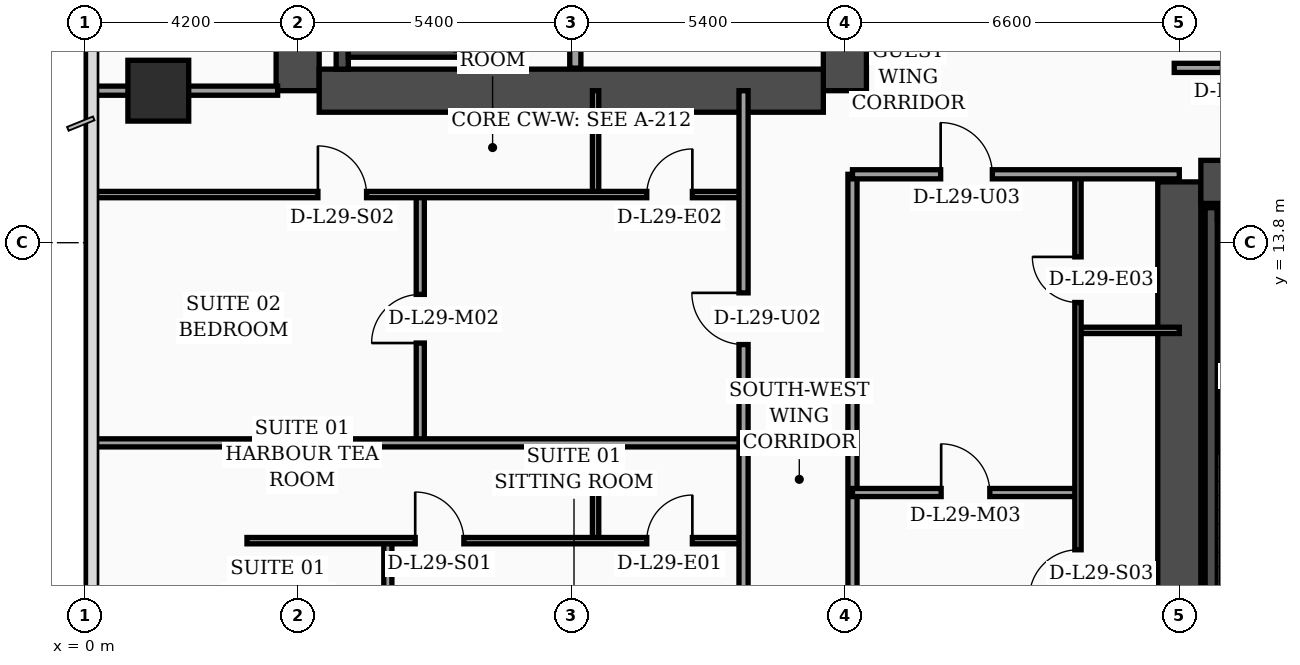
"""IFC4 building model, lengths in metres.
Left out: names, types, materials, properties, quantities, classifications, styles, units other than length and angle.
Written with IfcOpenShell. Run it as: python <this file> out.ifc"""

import sys

from ifc_helpers import new_model, si_unit, direction, frame, frame_2d, origin, origin_2d, place, context, subcontext, project, spatial, rectangle, extrude, element, fill, save


model = new_model("IFC4")
c1 = context("Model", 3, precision=1e-05, world=origin(), true_north=direction((0.0, 1.0)))
c2 = subcontext(c1, "Body", "Model", "MODEL_VIEW")
j1 = project(units=[si_unit("LENGTHUNIT", "METRE"), si_unit("PLANEANGLEUNIT", "RADIAN")], contexts=[c1])
p1 = place(None, origin())
s1 = spatial("IfcSite", under=j1, at=p1, CompositionType="ELEMENT")
p2 = place(p1, origin())
s2 = spatial("IfcBuilding", under=s1, at=p2, CompositionType="ELEMENT")
p3 = place(p2, frame((0.0, 0.0, 120.2)))
s3 = spatial("IfcBuildingStorey", under=s2, at=p3, CompositionType="ELEMENT", Elevation=120.2)
p4 = place(p3, frame((4.2, 16.8, 0.0), z_axis=(0.0, 0.0, 1.0), x_axis=(0.0, 1.0, 0.0)))
e1 = element("IfcWall", 1, at=p4, inside=s3, PredefinedType="SHEAR", context=c2, shape_type="SweptSolid", body=[
    extrude(rectangle(XDim=21.6, YDim=0.85, at=frame_2d((10.8, 0.0))), origin(), (0.0, 0.0, 1.0), 3.56),
])
p5 = place(p3, frame((15.0, 16.8, 0.0), z_axis=(0.0, 0.0, 1.0), x_axis=(0.0, 1.0, 0.0)))
e2 = element("IfcWall", 2, at=p5, inside=s3, PredefinedType="SHEAR", context=c2, shape_type="SweptSolid", body=[
    extrude(rectangle(XDim=21.6, YDim=0.85, at=frame_2d((10.8, 0.0))), origin(), (0.0, 0.0, 1.0), 3.56),
])
p6 = place(p5, frame((8.65, 0.0, 0.0)))
e3 = element("IfcOpeningElement", 3, at=p6, cuts=e2, PredefinedType="OPENING", context=c2, shape_type="SweptSolid", body=[
    extrude(rectangle(XDim=1.1, YDim=2.2, at=frame_2d((0.55, 1.1))), frame((0.0, 0.435, 0.0), z_axis=(0.0, -1.0, 0.0), x_axis=(1.0, 0.0, 0.0)), (0.0, 0.0, 1.0), 0.87),
])
p7 = place(p5, frame((10.85, 0.0, 0.0)))
e4 = element("IfcOpeningElement", 4, at=p7, cuts=e2, PredefinedType="OPENING", context=c2, shape_type="SweptSolid", body=[
    extrude(rectangle(XDim=1.1, YDim=2.2, at=frame_2d((0.55, 1.1))), frame((0.0, 0.435, 0.0), z_axis=(0.0, -1.0, 0.0), x_axis=(1.0, 0.0, 0.0)), (0.0, 0.0, 1.0), 0.87),
])
p8 = place(p5, frame((13.5, 0.0, 0.0)))
e5 = element("IfcOpeningElement", 5, at=p8, cuts=e2, PredefinedType="OPENING", context=c2, shape_type="SweptSolid", body=[
    extrude(rectangle(XDim=1.1, YDim=2.2, at=frame_2d((0.55, 1.1))), frame((0.0, 0.435, 0.0), z_axis=(0.0, -1.0, 0.0), x_axis=(1.0, 0.0, 0.0)), (0.0, 0.0, 1.0), 0.87),
])
p9 = place(p5, frame((16.15, 0.0, 0.0)))
e6 = element("IfcOpeningElement", 6, at=p9, cuts=e2, PredefinedType="OPENING", context=c2, shape_type="SweptSolid", body=[
    extrude(rectangle(XDim=1.1, YDim=2.2, at=frame_2d((0.55, 1.1))), frame((0.0, 0.435, 0.0), z_axis=(0.0, -1.0, 0.0), x_axis=(1.0, 0.0, 0.0)), (0.0, 0.0, 1.0), 0.87),
])
p10 = place(p3, frame((4.625, 16.8, 0.0), z_axis=(0.0, 0.0, 1.0), x_axis=(1.0, 0.0, 0.0)))
e7 = element("IfcWall", 7, at=p10, inside=s3, PredefinedType="SHEAR", context=c2, shape_type="SweptSolid", body=[
    extrude(rectangle(XDim=9.95, YDim=0.85, at=frame_2d((4.975, 0.0))), origin(), (0.0, 0.0, 1.0), 3.56),
])
p11 = place(p3, frame((21.6, 4.6, 0.0), z_axis=(0.0, 0.0, 1.0), x_axis=(0.0, 1.0, 0.0)))
e8 = element("IfcWall", 8, at=p11, inside=s3, PredefinedType="SHEAR", context=c2, shape_type="SweptSolid", body=[
    extrude(rectangle(XDim=10.4, YDim=0.85, at=frame_2d((5.2, 0.0))), origin(), (0.0, 0.0, 1.0), 3.56),
])
p12 = place(p3, frame((22.025, 15.0, 0.0), z_axis=(0.0, 0.0, 1.0), x_axis=(1.0, 0.0, 0.0)))
e9 = element("IfcWall", 9, at=p12, inside=s3, PredefinedType="SHEAR", context=c2, shape_type="SweptSolid", body=[
    extrude(rectangle(XDim=9.95, YDim=0.85, at=frame_2d((4.975, 0.0))), origin(), (0.0, 0.0, 1.0), 3.56),
])
p13 = place(p12, frame((4.88, 0.0, 0.0)))
e10 = element("IfcOpeningElement", 10, at=p13, cuts=e9, PredefinedType="OPENING", context=c2, shape_type="SweptSolid", body=[
    extrude(rectangle(XDim=1.1, YDim=2.2, at=frame_2d((0.55, 1.1))), frame((0.0, 0.435, 0.0), z_axis=(0.0, -1.0, 0.0), x_axis=(1.0, 0.0, 0.0)), (0.0, 0.0, 1.0), 0.87),
])
p14 = place(p3, frame((5.08, 17.225, 0.0), z_axis=(0.0, 0.0, 1.0), x_axis=(0.0, 1.0, 0.0)))
e11 = element("IfcWall", 11, at=p14, inside=s3, PredefinedType="SOLIDWALL", context=c2, shape_type="SweptSolid", body=[
    extrude(rectangle(XDim=9.565, YDim=0.24, at=frame_2d((4.782, 0.0))), origin(), (0.0, 0.0, 1.0), 3.56),
])
p15 = place(p3, frame((8.42, 17.225, 0.0), z_axis=(0.0, 0.0, 1.0), x_axis=(0.0, 1.0, 0.0)))
e12 = element("IfcWall", 12, at=p15, inside=s3, PredefinedType="SOLIDWALL", context=c2, shape_type="SweptSolid", body=[
    extrude(rectangle(XDim=9.565, YDim=0.24, at=frame_2d((4.782, 0.0))), origin(), (0.0, 0.0, 1.0), 3.56),
])
p16 = place(p15, frame((0.35, 0.0, 0.0)))
e13 = element("IfcOpeningElement", 13, at=p16, cuts=e12, PredefinedType="OPENING", context=c2, shape_type="SweptSolid", body=[
    extrude(rectangle(XDim=1.15, YDim=2.2, at=frame_2d((0.575, 1.1))), frame((0.0, 0.13, 0.0), z_axis=(0.0, -1.0, 0.0), x_axis=(1.0, 0.0, 0.0)), (0.0, 0.0, 1.0), 0.26),
])
p17 = place(p3, frame((5.2, 17.58, 0.0), z_axis=(0.0, 0.0, 1.0), x_axis=(1.0, 0.0, 0.0)))
e14 = element("IfcWall", 14, at=p17, inside=s3, PredefinedType="SOLIDWALL", context=c2, shape_type="SweptSolid", body=[
    extrude(rectangle(XDim=3.1, YDim=0.24, at=frame_2d((1.55, 0.0))), origin(), (0.0, 0.0, 1.0), 3.56),
])
p18 = place(p3, frame((22.23, 5.025, 0.0), z_axis=(0.0, 0.0, 1.0), x_axis=(0.0, 1.0, 0.0)))
e15 = element("IfcWall", 15, at=p18, inside=s3, PredefinedType="SOLIDWALL", context=c2, shape_type="SweptSolid", body=[
    extrude(rectangle(XDim=9.465, YDim=0.24, at=frame_2d((4.732, 0.0))), origin(), (0.0, 0.0, 1.0), 3.56),
])
p19 = place(p3, frame((22.35, 14.37, 0.0), z_axis=(0.0, 0.0, 1.0), x_axis=(1.0, 0.0, 0.0)))
e16 = element("IfcWall", 16, at=p19, inside=s3, PredefinedType="SOLIDWALL", context=c2, shape_type="SweptSolid", body=[
    extrude(rectangle(XDim=3.1, YDim=0.24, at=frame_2d((1.55, 0.0))), origin(), (0.0, 0.0, 1.0), 3.56),
])
p20 = place(p3, frame((1.45, 16.8, 0.0), z_axis=(0.0, 0.0, 1.0), x_axis=(1.0, 0.0, 0.0)))
e17 = element("IfcColumn", 17, at=p20, inside=s3, PredefinedType="COLUMN", context=c2, shape_type="SweptSolid", body=[
    extrude(rectangle(XDim=1.2, YDim=1.2, at=origin_2d()), origin(), (0.0, 0.0, 1.0), 3.56),
])
p21 = place(p3, frame((9.68, 17.245, 0.0), z_axis=(0.0, 0.0, 1.0), x_axis=(0.0, 1.0, 0.0)))
e18 = element("IfcWall", 18, at=p21, inside=s3, PredefinedType="SOLIDWALL", context=c2, shape_type="SweptSolid", body=[
    extrude(rectangle(XDim=7.755, YDim=0.22, at=frame_2d((3.877, 0.0))), origin(), (0.0, 0.0, 1.0), 3.56),
])
p22 = place(p3, frame((0.08, 16.8, 0.0), z_axis=(0.0, 0.0, 1.0), x_axis=(1.0, 0.0, 0.0)))
e19 = element("IfcWall", 19, at=p22, inside=s3, PredefinedType="PARTITIONING", context=c2, shape_type="SweptSolid", body=[
    extrude(rectangle(XDim=3.725, YDim=0.18, at=frame_2d((1.862, 0.0))), origin(), (0.0, 0.0, 1.0), 2.84),
])
p23 = place(p3, frame((10.08, 7.92, 0.0), z_axis=(0.0, 0.0, 1.0), x_axis=(0.0, 1.0, 0.0)))
e20 = element("IfcWall", 20, at=p23, inside=s3, PredefinedType="PARTITIONING", context=c2, shape_type="SweptSolid", body=[
    extrude(rectangle(XDim=1.93, YDim=0.125, at=frame_2d((0.965, 0.0))), origin(), (0.0, 0.0, 1.0), 3.09),
])
p24 = place(p3, frame((5.98, 2.44, 0.0), z_axis=(0.0, 0.0, 1.0), x_axis=(0.0, 1.0, 0.0)))
e21 = element("IfcWall", 21, at=p24, inside=s3, PredefinedType="PARTITIONING", context=c2, shape_type="SweptSolid", body=[
    extrude(rectangle(XDim=5.48, YDim=0.16, at=frame_2d((2.74, 0.0))), origin(), (0.0, 0.0, 1.0), 3.04),
])
p25 = place(p24, frame((2.26, 0.0, 0.0)))
e22 = element("IfcOpeningElement", 22, at=p25, cuts=e21, PredefinedType="OPENING", context=c2, shape_type="SweptSolid", body=[
    extrude(rectangle(XDim=0.96, YDim=2.2, at=frame_2d((0.48, 1.1))), frame((0.0, 0.09, 0.0), z_axis=(0.0, -1.0, 0.0), x_axis=(1.0, 0.0, 0.0)), (0.0, 0.0, 1.0), 0.18),
])
p26 = place(p3, frame((3.2, 7.92, 0.0), z_axis=(0.0, 0.0, 1.0), x_axis=(1.0, 0.0, 0.0)))
e23 = element("IfcWall", 23, at=p26, inside=s3, PredefinedType="PARTITIONING", context=c2, shape_type="SweptSolid", body=[
    extrude(rectangle(XDim=9.8, YDim=0.125, at=frame_2d((4.9, 0.0))), origin(), (0.0, 0.0, 1.0), 2.84),
])
p27 = place(p26, frame((3.32, 0.0, 0.0)))
e24 = element("IfcOpeningElement", 24, at=p27, cuts=e23, PredefinedType="OPENING", context=c2, shape_type="SweptSolid", body=[
    extrude(rectangle(XDim=0.96, YDim=2.2, at=frame_2d((0.48, 1.1))), frame((0.0, 0.073, 0.0), z_axis=(0.0, -1.0, 0.0), x_axis=(1.0, 0.0, 0.0)), (0.0, 0.0, 1.0), 0.145),
])
p28 = place(p26, frame((7.89, 0.0, 0.0)))
e25 = element("IfcOpeningElement", 25, at=p28, cuts=e23, PredefinedType="OPENING", context=c2, shape_type="SweptSolid", body=[
    extrude(rectangle(XDim=0.9, YDim=2.15, at=frame_2d((0.45, 1.075))), frame((0.0, 0.073, 0.0), z_axis=(0.0, -1.0, 0.0), x_axis=(1.0, 0.0, 0.0)), (0.0, 0.0, 1.0), 0.145),
])
p29 = place(p3, frame((10.08, 14.75, 0.0), z_axis=(0.0, 0.0, 1.0), x_axis=(0.0, 1.0, 0.0)))
e26 = element("IfcWall", 26, at=p29, inside=s3, PredefinedType="PARTITIONING", context=c2, shape_type="SweptSolid", body=[
    extrude(rectangle(XDim=2.05, YDim=0.125, at=frame_2d((1.025, 0.0))), origin(), (0.0, 0.0, 1.0), 3.56),
])
p30 = place(p3, frame((6.62, 9.85, 0.0), z_axis=(0.0, 0.0, 1.0), x_axis=(0.0, 1.0, 0.0)))
e27 = element("IfcWall", 27, at=p30, inside=s3, PredefinedType="PARTITIONING", context=c2, shape_type="SweptSolid", body=[
    extrude(rectangle(XDim=4.9, YDim=0.16, at=frame_2d((2.45, 0.0))), origin(), (0.0, 0.0, 1.0), 3.14),
])
p31 = place(p30, frame((1.97, 0.0, 0.0)))
e28 = element("IfcOpeningElement", 28, at=p31, cuts=e27, PredefinedType="OPENING", context=c2, shape_type="SweptSolid", body=[
    extrude(rectangle(XDim=0.96, YDim=2.2, at=frame_2d((0.48, 1.1))), frame((0.0, 0.09, 0.0), z_axis=(0.0, -1.0, 0.0), x_axis=(1.0, 0.0, 0.0)), (0.0, 0.0, 1.0), 0.18),
])
p32 = place(p3, frame((0.08, 14.75, 0.0), z_axis=(0.0, 0.0, 1.0), x_axis=(1.0, 0.0, 0.0)))
e29 = element("IfcWall", 29, at=p32, inside=s3, PredefinedType="PARTITIONING", context=c2, shape_type="SweptSolid", body=[
    extrude(rectangle(XDim=12.92, YDim=0.125, at=frame_2d((6.46, 0.0))), origin(), (0.0, 0.0, 1.0), 2.84),
])
p33 = place(p32, frame((4.52, 0.0, 0.0)))
e30 = element("IfcOpeningElement", 30, at=p33, cuts=e29, PredefinedType="OPENING", context=c2, shape_type="SweptSolid", body=[
    extrude(rectangle(XDim=0.96, YDim=2.2, at=frame_2d((0.48, 1.1))), frame((0.0, 0.073, 0.0), z_axis=(0.0, -1.0, 0.0), x_axis=(1.0, 0.0, 0.0)), (0.0, 0.0, 1.0), 0.145),
])
p34 = place(p32, frame((11.01, 0.0, 0.0)))
e31 = element("IfcOpeningElement", 31, at=p34, cuts=e29, PredefinedType="OPENING", context=c2, shape_type="SweptSolid", body=[
    extrude(rectangle(XDim=0.9, YDim=2.15, at=frame_2d((0.45, 1.075))), frame((0.0, 0.073, 0.0), z_axis=(0.0, -1.0, 0.0), x_axis=(1.0, 0.0, 0.0)), (0.0, 0.0, 1.0), 0.145),
])
p35 = place(p3, frame((0.08, 9.85, 0.0), z_axis=(0.0, 0.0, 1.0), x_axis=(1.0, 0.0, 0.0)))
e32 = element("IfcWall", 32, at=p35, inside=s3, PredefinedType="PARTITIONING", context=c2, shape_type="SweptSolid", body=[
    extrude(rectangle(XDim=12.92, YDim=0.16, at=frame_2d((6.46, 0.0))), origin(), (0.0, 0.0, 1.0), 2.84),
])
p36 = place(p3, frame((13.0, 2.44, 0.0), z_axis=(0.0, 0.0, 1.0), x_axis=(0.0, 1.0, 0.0)))
e33 = element("IfcWall", 33, at=p36, inside=s3, PredefinedType="PARTITIONING", context=c2, shape_type="SweptSolid", body=[
    extrude(rectangle(XDim=14.36, YDim=0.18, at=frame_2d((7.18, 0.0))), origin(), (0.0, 0.0, 1.0), 2.84),
])
p37 = place(p36, frame((3.01, 0.0, 0.0)))
e34 = element("IfcOpeningElement", 34, at=p37, cuts=e33, PredefinedType="OPENING", context=c2, shape_type="SweptSolid", body=[
    extrude(rectangle(XDim=1.02, YDim=2.2, at=frame_2d((0.51, 1.1))), frame((0.0, 0.1, 0.0), z_axis=(0.0, -1.0, 0.0), x_axis=(1.0, 0.0, 0.0)), (0.0, 0.0, 1.0), 0.2),
])
p38 = place(p36, frame((9.35, 0.0, 0.0)))
e35 = element("IfcOpeningElement", 35, at=p38, cuts=e33, PredefinedType="OPENING", context=c2, shape_type="SweptSolid", body=[
    extrude(rectangle(XDim=1.02, YDim=2.2, at=frame_2d((0.51, 1.1))), frame((0.0, 0.1, 0.0), z_axis=(0.0, -1.0, 0.0), x_axis=(1.0, 0.0, 0.0)), (0.0, 0.0, 1.0), 0.2),
])
p39 = place(p3, frame((15.15, 2.44, 0.0), z_axis=(0.0, 0.0, 1.0), x_axis=(0.0, 1.0, 0.0)))
e36 = element("IfcWall", 36, at=p39, inside=s3, PredefinedType="PARTITIONING", context=c2, shape_type="SweptSolid", body=[
    extrude(rectangle(XDim=12.71, YDim=0.18, at=frame_2d((6.355, 0.0))), origin(), (0.0, 0.0, 1.0), 3.04),
])
p40 = place(p3, frame((19.6, 12.07, 0.0), z_axis=(0.0, 0.0, 1.0), x_axis=(1.0, 0.0, 0.0)))
e37 = element("IfcWall", 37, at=p40, inside=s3, PredefinedType="PARTITIONING", context=c2, shape_type="SweptSolid", body=[
    extrude(rectangle(XDim=2.0, YDim=0.125, at=frame_2d((1.0, 0.0))), origin(), (0.0, 0.0, 1.0), 3.56),
])
p41 = place(p3, frame((15.15, 8.87, 0.0), z_axis=(0.0, 0.0, 1.0), x_axis=(1.0, 0.0, 0.0)))
e38 = element("IfcWall", 38, at=p41, inside=s3, PredefinedType="PARTITIONING", context=c2, shape_type="SweptSolid", body=[
    extrude(rectangle(XDim=4.45, YDim=0.16, at=frame_2d((2.225, 0.0))), origin(), (0.0, 0.0, 1.0), 3.56),
])
p42 = place(p41, frame((1.75, 0.0, 0.0)))
e39 = element("IfcOpeningElement", 39, at=p42, cuts=e38, PredefinedType="OPENING", context=c2, shape_type="SweptSolid", body=[
    extrude(rectangle(XDim=0.96, YDim=2.2, at=frame_2d((0.48, 1.1))), frame((0.0, 0.09, 0.0), z_axis=(0.0, -1.0, 0.0), x_axis=(1.0, 0.0, 0.0)), (0.0, 0.0, 1.0), 0.18),
])
p43 = place(p3, frame((19.6, 2.44, 0.0), z_axis=(0.0, 0.0, 1.0), x_axis=(0.0, 1.0, 0.0)))
e40 = element("IfcWall", 40, at=p43, inside=s3, PredefinedType="PARTITIONING", context=c2, shape_type="SweptSolid", body=[
    extrude(rectangle(XDim=12.71, YDim=0.125, at=frame_2d((6.355, 0.0))), origin(), (0.0, 0.0, 1.0), 2.49),
])
p44 = place(p43, frame((4.34, 0.0, 0.0)))
e41 = element("IfcOpeningElement", 41, at=p44, cuts=e40, PredefinedType="OPENING", context=c2, shape_type="SweptSolid", body=[
    extrude(rectangle(XDim=0.96, YDim=2.2, at=frame_2d((0.48, 1.1))), frame((0.0, 0.073, 0.0), z_axis=(0.0, -1.0, 0.0), x_axis=(1.0, 0.0, 0.0)), (0.0, 0.0, 1.0), 0.145),
])
p45 = place(p43, frame((10.18, 0.0, 0.0)))
e42 = element("IfcOpeningElement", 42, at=p45, cuts=e40, PredefinedType="OPENING", context=c2, shape_type="SweptSolid", body=[
    extrude(rectangle(XDim=0.9, YDim=2.15, at=frame_2d((0.45, 1.075))), frame((0.0, 0.073, 0.0), z_axis=(0.0, -1.0, 0.0), x_axis=(1.0, 0.0, 0.0)), (0.0, 0.0, 1.0), 0.145),
])
p46 = place(p3, frame((15.15, 15.15, 0.0), z_axis=(0.0, 0.0, 1.0), x_axis=(1.0, 0.0, 0.0)))
e43 = element("IfcWall", 43, at=p46, inside=s3, PredefinedType="PARTITIONING", context=c2, shape_type="SweptSolid", body=[
    extrude(rectangle(XDim=6.45, YDim=0.18, at=frame_2d((3.225, 0.0))), origin(), (0.0, 0.0, 1.0), 2.49),
])
p47 = place(p46, frame((1.74, 0.0, 0.0)))
e44 = element("IfcOpeningElement", 44, at=p47, cuts=e43, PredefinedType="OPENING", context=c2, shape_type="SweptSolid", body=[
    extrude(rectangle(XDim=1.02, YDim=2.2, at=frame_2d((0.51, 1.1))), frame((0.0, 0.1, 0.0), z_axis=(0.0, -1.0, 0.0), x_axis=(1.0, 0.0, 0.0)), (0.0, 0.0, 1.0), 0.2),
])
p48 = place(p3, frame((21.5, 17.25, 0.0), z_axis=(0.0, 0.0, 1.0), x_axis=(1.0, 0.0, 0.0)))
e45 = element("IfcWall", 45, at=p48, inside=s3, PredefinedType="PARTITIONING", context=c2, shape_type="SweptSolid", body=[
    extrude(rectangle(XDim=24.25, YDim=0.18, at=frame_2d((12.125, 0.0))), origin(), (0.0, 0.0, 1.0), 2.84),
])
p49 = place(p48, frame((0.95, 0.0, 0.0)))
e46 = element("IfcOpeningElement", 46, at=p49, cuts=e45, PredefinedType="OPENING", context=c2, shape_type="SweptSolid", body=[
    extrude(rectangle(XDim=1.02, YDim=2.2, at=frame_2d((0.51, 1.1))), frame((0.0, 0.1, 0.0), z_axis=(0.0, -1.0, 0.0), x_axis=(1.0, 0.0, 0.0)), (0.0, 0.0, 1.0), 0.2),
])
p50 = place(p48, frame((9.0, 0.0, 0.0)))
e47 = element("IfcOpeningElement", 47, at=p50, cuts=e45, PredefinedType="OPENING", context=c2, shape_type="SweptSolid", body=[
    extrude(rectangle(XDim=1.02, YDim=2.2, at=frame_2d((0.51, 1.1))), frame((0.0, 0.1, 0.0), z_axis=(0.0, -1.0, 0.0), x_axis=(1.0, 0.0, 0.0)), (0.0, 0.0, 1.0), 0.2),
])
p51 = place(p48, frame((17.05, 0.0, 0.0)))
e48 = element("IfcOpeningElement", 48, at=p51, cuts=e45, PredefinedType="OPENING", context=c2, shape_type="SweptSolid", body=[
    extrude(rectangle(XDim=1.02, YDim=2.2, at=frame_2d((0.51, 1.1))), frame((0.0, 0.1, 0.0), z_axis=(0.0, -1.0, 0.0), x_axis=(1.0, 0.0, 0.0)), (0.0, 0.0, 1.0), 0.2),
])
p52 = place(p27, origin())
e49 = element("IfcDoor", 49, at=p52, inside=s3, OperationType="SINGLE_SWING_LEFT", PredefinedType="DOOR", context=c2, shape_type="SweptSolid", body=[
    extrude(rectangle(XDim=0.96, YDim=2.2, at=frame_2d((0.48, 1.1))), frame((0.0, 0.025, 0.0), z_axis=(0.0, -1.0, 0.0), x_axis=(1.0, 0.0, 0.0)), (0.0, 0.0, 1.0), 0.05),
])
fill(e24, e49)
p53 = place(p28, origin())
e50 = element("IfcDoor", 50, at=p53, inside=s3, OperationType="SINGLE_SWING_RIGHT", PredefinedType="DOOR", context=c2, shape_type="SweptSolid", body=[
    extrude(rectangle(XDim=0.9, YDim=2.15, at=frame_2d((0.45, 1.075))), frame((0.0, 0.025, 0.0), z_axis=(0.0, -1.0, 0.0), x_axis=(1.0, 0.0, 0.0)), (0.0, 0.0, 1.0), 0.05),
])
fill(e25, e50)
p54 = place(p31, origin())
e51 = element("IfcDoor", 51, at=p54, inside=s3, OperationType="SINGLE_SWING_LEFT", PredefinedType="DOOR", context=c2, shape_type="SweptSolid", body=[
    extrude(rectangle(XDim=0.96, YDim=2.2, at=frame_2d((0.48, 1.1))), frame((0.0, 0.025, 0.0), z_axis=(0.0, -1.0, 0.0), x_axis=(1.0, 0.0, 0.0)), (0.0, 0.0, 1.0), 0.05),
])
fill(e28, e51)
p55 = place(p33, origin())
e52 = element("IfcDoor", 52, at=p55, inside=s3, OperationType="SINGLE_SWING_LEFT", PredefinedType="DOOR", context=c2, shape_type="SweptSolid", body=[
    extrude(rectangle(XDim=0.96, YDim=2.2, at=frame_2d((0.48, 1.1))), frame((0.0, 0.025, 0.0), z_axis=(0.0, -1.0, 0.0), x_axis=(1.0, 0.0, 0.0)), (0.0, 0.0, 1.0), 0.05),
])
fill(e30, e52)
p56 = place(p34, origin())
e53 = element("IfcDoor", 53, at=p56, inside=s3, OperationType="SINGLE_SWING_RIGHT", PredefinedType="DOOR", context=c2, shape_type="SweptSolid", body=[
    extrude(rectangle(XDim=0.9, YDim=2.15, at=frame_2d((0.45, 1.075))), frame((0.0, 0.025, 0.0), z_axis=(0.0, -1.0, 0.0), x_axis=(1.0, 0.0, 0.0)), (0.0, 0.0, 1.0), 0.05),
])
fill(e31, e53)
p57 = place(p38, origin())
e54 = element("IfcDoor", 54, at=p57, inside=s3, OperationType="SINGLE_SWING_RIGHT", PredefinedType="DOOR", context=c2, shape_type="SweptSolid", body=[
    extrude(rectangle(XDim=1.02, YDim=2.2, at=frame_2d((0.51, 1.1))), frame((0.0, 0.025, 0.0), z_axis=(0.0, -1.0, 0.0), x_axis=(1.0, 0.0, 0.0)), (0.0, 0.0, 1.0), 0.05),
])
fill(e35, e54)
p58 = place(p42, origin())
e55 = element("IfcDoor", 55, at=p58, inside=s3, OperationType="SINGLE_SWING_LEFT", PredefinedType="DOOR", context=c2, shape_type="SweptSolid", body=[
    extrude(rectangle(XDim=0.96, YDim=2.2, at=frame_2d((0.48, 1.1))), frame((0.0, 0.025, 0.0), z_axis=(0.0, -1.0, 0.0), x_axis=(1.0, 0.0, 0.0)), (0.0, 0.0, 1.0), 0.05),
])
fill(e39, e55)
p59 = place(p44, origin())
e56 = element("IfcDoor", 56, at=p59, inside=s3, OperationType="SINGLE_SWING_LEFT", PredefinedType="DOOR", context=c2, shape_type="SweptSolid", body=[
    extrude(rectangle(XDim=0.96, YDim=2.2, at=frame_2d((0.48, 1.1))), frame((0.0, 0.025, 0.0), z_axis=(0.0, -1.0, 0.0), x_axis=(1.0, 0.0, 0.0)), (0.0, 0.0, 1.0), 0.05),
])
fill(e41, e56)
p60 = place(p45, origin())
e57 = element("IfcDoor", 57, at=p60, inside=s3, OperationType="SINGLE_SWING_RIGHT", PredefinedType="DOOR", context=c2, shape_type="SweptSolid", body=[
    extrude(rectangle(XDim=0.9, YDim=2.15, at=frame_2d((0.45, 1.075))), frame((0.0, 0.025, 0.0), z_axis=(0.0, -1.0, 0.0), x_axis=(1.0, 0.0, 0.0)), (0.0, 0.0, 1.0), 0.05),
])
fill(e42, e57)
p61 = place(p47, origin())
e58 = element("IfcDoor", 58, at=p61, inside=s3, OperationType="SINGLE_SWING_LEFT", PredefinedType="DOOR", context=c2, shape_type="SweptSolid", body=[
    extrude(rectangle(XDim=1.02, YDim=2.2, at=frame_2d((0.51, 1.1))), frame((0.0, 0.025, 0.0), z_axis=(0.0, -1.0, 0.0), x_axis=(1.0, 0.0, 0.0)), (0.0, 0.0, 1.0), 0.05),
])
fill(e44, e58)
save(model, sys.argv[1])
